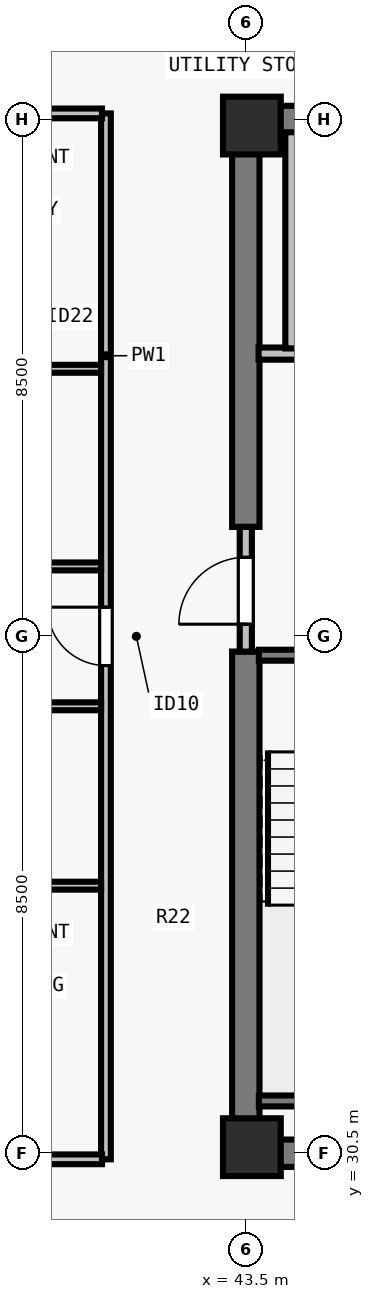
"""IFC4 building model, lengths in metres.
Left out: names, types, materials, properties, quantities, classifications, styles, units other than length and angle.
Written with IfcOpenShell. Run it as: python <this file> out.ifc"""

import sys

from ifc_helpers import new_model, si_unit, direction, frame, frame_2d, origin, origin_2d, place, context, subcontext, project, spatial, rectangle, extrude, element, fill, save


model = new_model("IFC4")
c1 = context("Model", 3, precision=1e-05, world=origin(), true_north=direction((0.0, 1.0)))
c2 = subcontext(c1, "Body", "Model", "MODEL_VIEW")
j1 = project(units=[si_unit("LENGTHUNIT", "METRE"), si_unit("PLANEANGLEUNIT", "RADIAN")], contexts=[c1])
p1 = place(None, origin())
s1 = spatial("IfcSite", under=j1, at=p1, CompositionType="ELEMENT")
p2 = place(p1, origin())
s2 = spatial("IfcBuilding", under=s1, at=p2, CompositionType="ELEMENT")
p3 = place(p2, frame((0.0, 0.0, 230.5)))
s3 = spatial("IfcBuildingStorey", under=s2, at=p3, CompositionType="ELEMENT", Elevation=230.5)
for number, where, z_axis, x_axis in (
    (1, (43.6, 30.6, 0.0), (0.0, 0.0, 1.0), (1.0, 0.0, 0.0)),
    (2, (43.6, 47.4, 0.0), (0.0, 0.0, 1.0), (1.0, 0.0, 0.0)),
):
    element("IfcColumn", number, at=place(p3, frame(where, z_axis=z_axis, x_axis=x_axis)), inside=s3, PredefinedType="COLUMN", context=c2, shape_type="SweptSolid", body=[
        extrude(rectangle(XDim=0.95, YDim=0.95, at=origin_2d()), origin(), (0.0, 0.0, 1.0), 3.5),
    ])
for number, where, z_axis, x_axis in (
    (3, (43.275, 30.5, 0.0), (0.0, 0.0, 1.0), (1.0, 0.0, 0.0)),
    (4, (43.275, 47.5, 0.0), (0.0, 0.0, 1.0), (1.0, 0.0, 0.0)),
):
    element("IfcWall", number, at=place(p3, frame(where, z_axis=z_axis, x_axis=x_axis)), inside=s3, PredefinedType="SHEAR", context=c2, shape_type="SweptSolid", body=[
        extrude(rectangle(XDim=17.45, YDim=0.45, at=frame_2d((8.725, 0.0))), origin(), (0.0, 0.0, 1.0), 3.29),
    ])
p4 = place(p3, frame((43.5, 30.715, 0.0), z_axis=(0.0, 0.0, 1.0), x_axis=(0.0, 1.0, 0.0)))
e5 = element("IfcWall", 5, at=p4, inside=s3, PredefinedType="SHEAR", context=c2, shape_type="SweptSolid", body=[
    extrude(rectangle(XDim=8.035, YDim=0.45, at=frame_2d((4.018, 0.0))), origin(), (0.0, 0.0, 1.0), 3.29),
])
p5 = place(p3, frame((43.5, 40.8, 0.0), z_axis=(0.0, 0.0, 1.0), x_axis=(0.0, 1.0, 0.0)))
e6 = element("IfcWall", 6, at=p5, inside=s3, PredefinedType="SHEAR", context=c2, shape_type="SweptSolid", body=[
    extrude(rectangle(XDim=6.485, YDim=0.45, at=frame_2d((3.242, 0.0))), origin(), (0.0, 0.0, 1.0), 3.29),
])
p6 = place(p3, frame((43.5, 38.75, 0.0), z_axis=(0.0, 0.0, 1.0), x_axis=(0.0, 1.0, 0.0)))
e7 = element("IfcWall", 7, at=p6, inside=s3, PredefinedType="SOLIDWALL", context=c2, shape_type="SweptSolid", body=[
    extrude(rectangle(XDim=2.05, YDim=0.2, at=frame_2d((1.025, 0.0))), origin(), (0.0, 0.0, 1.0), 3.29),
])
p7 = place(p6, frame((0.45, 0.0, 0.0)))
e8 = element("IfcOpeningElement", 8, at=p7, cuts=e7, PredefinedType="OPENING", context=c2, shape_type="SweptSolid", body=[
    extrude(rectangle(XDim=1.1, YDim=2.15, at=frame_2d((0.55, 1.075))), frame((0.0, 0.11, 0.0), z_axis=(0.0, -1.0, 0.0), x_axis=(1.0, 0.0, 0.0)), (0.0, 0.0, 1.0), 0.22),
])
p8 = place(p3, frame((43.71, 43.65, 0.0), z_axis=(0.0, 0.0, 1.0), x_axis=(1.0, 0.0, 0.0)))
e9 = element("IfcWall", 9, at=p8, inside=s3, PredefinedType="SOLIDWALL", context=c2, shape_type="SweptSolid", body=[
    extrude(rectangle(XDim=3.555, YDim=0.2, at=frame_2d((1.777, 0.0))), origin(), (0.0, 0.0, 1.0), 3.29),
])
p9 = place(p8, frame((1.16, 0.0, 0.0)))
e10 = element("IfcOpeningElement", 10, at=p9, cuts=e9, PredefinedType="OPENING", context=c2, shape_type="SweptSolid", body=[
    extrude(rectangle(XDim=1.1, YDim=2.2, at=frame_2d((0.55, 1.1))), frame((0.0, 0.11, 0.0), z_axis=(0.0, -1.0, 0.0), x_axis=(1.0, 0.0, 0.0)), (0.0, 0.0, 1.0), 0.22),
])
p10 = place(p3, frame((44.25, 43.735, 0.0), z_axis=(0.0, 0.0, 1.0), x_axis=(0.0, 1.0, 0.0)))
e11 = element("IfcWall", 11, at=p10, inside=s3, PredefinedType="SOLIDWALL", context=c2, shape_type="SweptSolid", body=[
    extrude(rectangle(XDim=3.555, YDim=0.2, at=frame_2d((1.777, 0.0))), origin(), (0.0, 0.0, 1.0), 3.29),
])
p11 = place(p3, frame((41.2, 30.4, 0.0), z_axis=(0.0, 0.0, 1.0), x_axis=(0.0, 1.0, 0.0)))
e12 = element("IfcWall", 12, at=p11, inside=s3, PredefinedType="PARTITIONING", context=c2, shape_type="SweptSolid", body=[
    extrude(rectangle(XDim=17.2, YDim=0.16, at=frame_2d((8.6, 0.0))), origin(), (0.0, 0.0, 1.0), 3.29),
])
p12 = place(p11, frame((8.12, 0.0, 0.0)))
e13 = element("IfcOpeningElement", 13, at=p12, cuts=e12, PredefinedType="OPENING", context=c2, shape_type="SweptSolid", body=[
    extrude(rectangle(XDim=0.96, YDim=2.18, at=frame_2d((0.48, 1.09))), frame((0.0, 0.09, 0.0), z_axis=(0.0, -1.0, 0.0), x_axis=(1.0, 0.0, 0.0)), (0.0, 0.0, 1.0), 0.18),
])
p13 = place(p3, frame((29.805, 30.4, 0.0), z_axis=(0.0, 0.0, 1.0), x_axis=(1.0, 0.0, 0.0)))
e14 = element("IfcWall", 14, at=p13, inside=s3, PredefinedType="PARTITIONING", context=c2, shape_type="SweptSolid", body=[
    extrude(rectangle(XDim=11.33, YDim=0.16, at=frame_2d((5.665, 0.0))), origin(), (0.0, 0.0, 1.0), 3.29),
])
p14 = place(p3, frame((29.77, 47.6, 0.0), z_axis=(0.0, 0.0, 1.0), x_axis=(1.0, 0.0, 0.0)))
e15 = element("IfcWall", 15, at=p14, inside=s3, PredefinedType="PARTITIONING", context=c2, shape_type="SweptSolid", body=[
    extrude(rectangle(XDim=11.365, YDim=0.16, at=frame_2d((5.683, 0.0))), origin(), (0.0, 0.0, 1.0), 3.29),
])
p15 = place(p3, frame((38.37, 34.9, 0.0), z_axis=(0.0, 0.0, 1.0), x_axis=(1.0, 0.0, 0.0)))
e16 = element("IfcWall", 16, at=p15, inside=s3, PredefinedType="PLUMBINGWALL", context=c2, shape_type="SweptSolid", body=[
    extrude(rectangle(XDim=2.75, YDim=0.13, at=frame_2d((1.375, 0.0))), origin(), (0.0, 0.0, 1.0), 3.29),
])
p16 = place(p3, frame((38.37, 37.85, 0.0), z_axis=(0.0, 0.0, 1.0), x_axis=(1.0, 0.0, 0.0)))
e17 = element("IfcWall", 17, at=p16, inside=s3, PredefinedType="PLUMBINGWALL", context=c2, shape_type="SweptSolid", body=[
    extrude(rectangle(XDim=2.75, YDim=0.13, at=frame_2d((1.375, 0.0))), origin(), (0.0, 0.0, 1.0), 3.29),
])
p17 = place(p16, frame((0.55, 0.0, 0.0)))
e18 = element("IfcOpeningElement", 18, at=p17, cuts=e17, PredefinedType="OPENING", context=c2, shape_type="SweptSolid", body=[
    extrude(rectangle(XDim=0.85, YDim=2.08, at=frame_2d((0.425, 1.04))), frame((0.0, 0.075, 0.0), z_axis=(0.0, -1.0, 0.0), x_axis=(1.0, 0.0, 0.0)), (0.0, 0.0, 1.0), 0.15),
])
p18 = place(p3, frame((38.37, 43.4, 0.0), z_axis=(0.0, 0.0, 1.0), x_axis=(1.0, 0.0, 0.0)))
e19 = element("IfcWall", 19, at=p18, inside=s3, PredefinedType="PLUMBINGWALL", context=c2, shape_type="SweptSolid", body=[
    extrude(rectangle(XDim=2.75, YDim=0.13, at=frame_2d((1.375, 0.0))), origin(), (0.0, 0.0, 1.0), 2.958),
])
p19 = place(p3, frame((38.37, 40.15, 0.0), z_axis=(0.0, 0.0, 1.0), x_axis=(1.0, 0.0, 0.0)))
e20 = element("IfcWall", 20, at=p19, inside=s3, PredefinedType="PLUMBINGWALL", context=c2, shape_type="SweptSolid", body=[
    extrude(rectangle(XDim=2.75, YDim=0.13, at=frame_2d((1.375, 0.0))), origin(), (0.0, 0.0, 1.0), 3.29),
])
p20 = place(p19, frame((0.55, 0.0, 0.0)))
e21 = element("IfcOpeningElement", 21, at=p20, cuts=e20, PredefinedType="OPENING", context=c2, shape_type="SweptSolid", body=[
    extrude(rectangle(XDim=0.88, YDim=2.1, at=frame_2d((0.44, 1.05))), frame((0.0, 0.075, 0.0), z_axis=(0.0, -1.0, 0.0), x_axis=(1.0, 0.0, 0.0)), (0.0, 0.0, 1.0), 0.15),
])
p21 = place(p3, frame((43.715, 38.69, 0.0), z_axis=(0.0, 0.0, 1.0), x_axis=(1.0, 0.0, 0.0)))
e22 = element("IfcWall", 22, at=p21, inside=s3, PredefinedType="SOLIDWALL", context=c2, shape_type="SweptSolid", body=[
    extrude(rectangle(XDim=3.28, YDim=0.18, at=frame_2d((1.64, 0.0))), origin(), (0.0, 0.0, 1.0), 3.29),
])
p22 = place(p21, frame((1.165, 0.0, 0.0)))
e23 = element("IfcOpeningElement", 23, at=p22, cuts=e22, PredefinedType="OPENING", context=c2, shape_type="SweptSolid", body=[
    extrude(rectangle(XDim=0.95, YDim=2.15, at=frame_2d((0.475, 1.075))), frame((0.0, 0.1, 0.0), z_axis=(0.0, -1.0, 0.0), x_axis=(1.0, 0.0, 0.0)), (0.0, 0.0, 1.0), 0.2),
])
p23 = place(p3, frame((43.715, 31.36, 0.0), z_axis=(0.0, 0.0, 1.0), x_axis=(1.0, 0.0, 0.0)))
e24 = element("IfcWall", 24, at=p23, inside=s3, PredefinedType="SOLIDWALL", context=c2, shape_type="SweptSolid", body=[
    extrude(rectangle(XDim=3.28, YDim=0.18, at=frame_2d((1.64, 0.0))), origin(), (0.0, 0.0, 1.0), 3.29),
])
p24 = place(p7, origin())
e25 = element("IfcDoor", 25, at=p24, inside=s3, OperationType="SINGLE_SWING_LEFT", PredefinedType="DOOR", context=c2, shape_type="SweptSolid", body=[
    extrude(rectangle(XDim=1.1, YDim=2.15, at=frame_2d((0.55, 1.075))), frame((0.0, 0.025, 0.0), z_axis=(0.0, -1.0, 0.0), x_axis=(1.0, 0.0, 0.0)), (0.0, 0.0, 1.0), 0.05),
])
fill(e8, e25)
p25 = place(p12, origin())
e26 = element("IfcDoor", 26, at=p25, inside=s3, OperationType="SINGLE_SWING_RIGHT", PredefinedType="DOOR", context=c2, shape_type="SweptSolid", body=[
    extrude(rectangle(XDim=0.96, YDim=2.18, at=frame_2d((0.48, 1.09))), frame((0.0, 0.025, 0.0), z_axis=(0.0, -1.0, 0.0), x_axis=(1.0, 0.0, 0.0)), (0.0, 0.0, 1.0), 0.05),
])
fill(e13, e26)
save(model, sys.argv[1])
